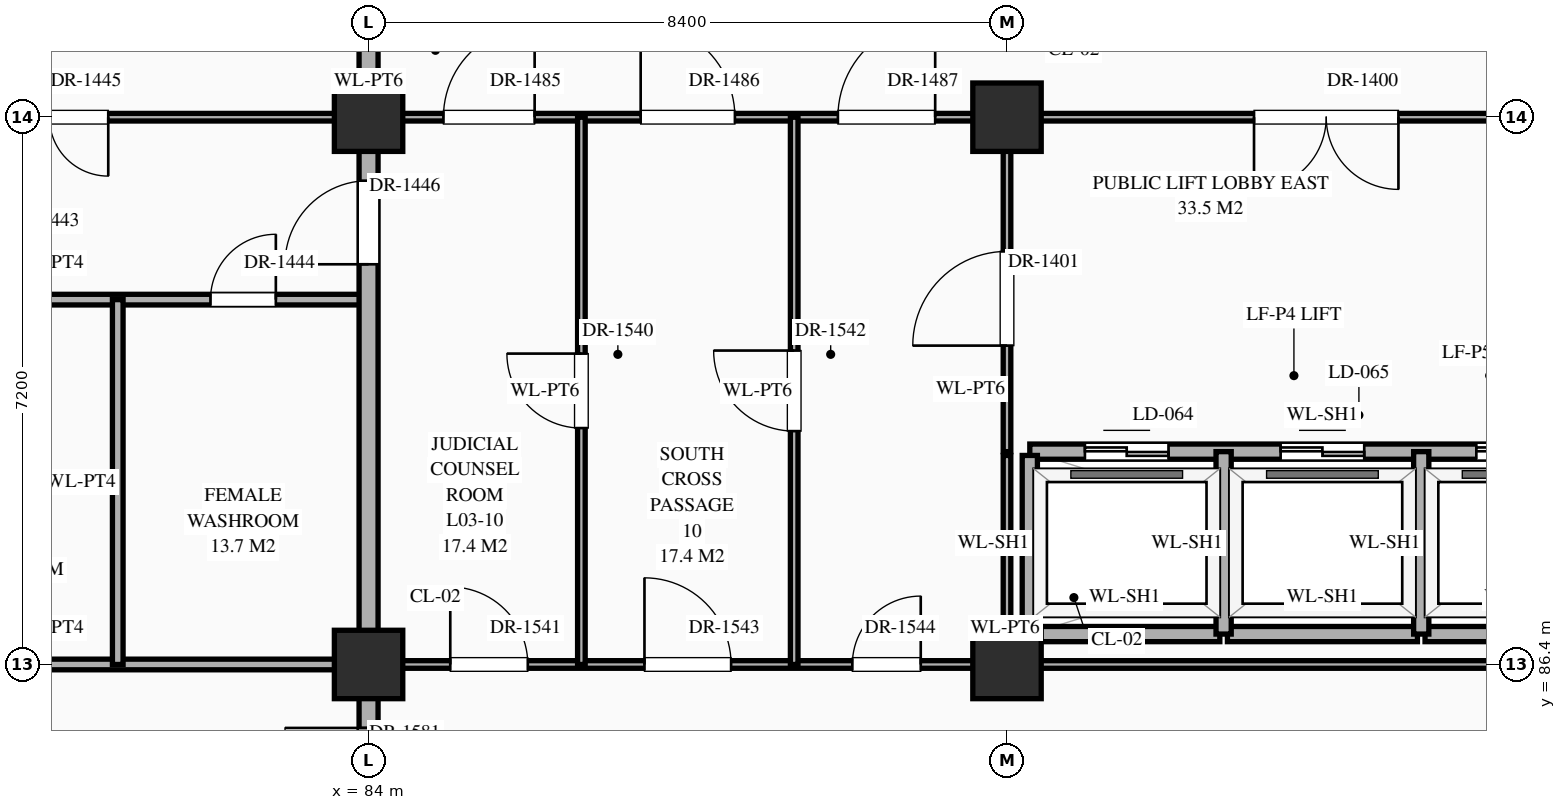
"""IFC4 building model, lengths in metres.
Left out: names, types, materials, properties, quantities, classifications, styles, units other than length and angle.
Written with IfcOpenShell. Run it as: python <this file> out.ifc"""

import sys

from ifc_helpers import new_model, si_unit, direction, frame, frame_2d, origin, origin_2d, place, context, subcontext, project, spatial, rectangle, extrude, element, fill, save


model = new_model("IFC4")
c1 = context("Model", 3, precision=1e-05, world=origin(), true_north=direction((0.0, 1.0)))
c2 = subcontext(c1, "Body", "Model", "MODEL_VIEW")
j1 = project(units=[si_unit("LENGTHUNIT", "METRE"), si_unit("PLANEANGLEUNIT", "RADIAN")], contexts=[c1])
p1 = place(None, origin())
s1 = spatial("IfcSite", under=j1, at=p1, CompositionType="ELEMENT")
p2 = place(p1, origin())
s2 = spatial("IfcBuilding", under=s1, at=p2, CompositionType="ELEMENT")
p3 = place(p2, frame((0.0, 0.0, 10.8)))
s3 = spatial("IfcBuildingStorey", under=s2, at=p3, CompositionType="ELEMENT", Elevation=10.8)
for number, where, z_axis, x_axis in (
    (1, (84.0, 86.4, 0.0), (0.0, 0.0, 1.0), (1.0, 0.0, 0.0)),
    (2, (84.0, 93.6, 0.0), (0.0, 0.0, 1.0), (1.0, 0.0, 0.0)),
    (3, (92.4, 86.4, 0.0), (0.0, 0.0, 1.0), (1.0, 0.0, 0.0)),
    (4, (92.4, 93.6, 0.0), (0.0, 0.0, 1.0), (1.0, 0.0, 0.0)),
):
    element("IfcColumn", number, at=place(p3, frame(where, z_axis=z_axis, x_axis=x_axis)), inside=s3, PredefinedType="COLUMN", context=c2, shape_type="SweptSolid", body=[
        extrude(rectangle(XDim=0.9, YDim=0.9, at=origin_2d()), origin(), (0.0, 0.0, 1.0), 5.4),
    ])
p4 = place(p3, frame((75.6, 86.4, 0.0), z_axis=(0.0, 0.0, 1.0), x_axis=(1.0, 0.0, 0.0)))
e5 = element("IfcWall", 5, at=p4, inside=s3, PredefinedType="STANDARD", context=c2, shape_type="SweptSolid", body=[
    extrude(rectangle(XDim=8.4, YDim=0.14, at=frame_2d((4.2, 0.0))), origin(), (0.0, 0.0, 1.0), 4.27),
])
p5 = place(p3, frame((84.0, 86.4, 0.0), z_axis=(0.0, 0.0, 1.0), x_axis=(1.0, 0.0, 0.0)))
e6 = element("IfcWall", 6, at=p5, inside=s3, PredefinedType="STANDARD", context=c2, shape_type="SweptSolid", body=[
    extrude(rectangle(XDim=8.4, YDim=0.1, at=frame_2d((4.2, 0.0))), origin(), (0.0, 0.0, 1.0), 4.27),
])
p6 = place(p5, frame((1.075, 0.0, 0.0)))
e7 = element("IfcOpeningElement", 7, at=p6, cuts=e6, PredefinedType="OPENING", context=c2, shape_type="SweptSolid", body=[
    extrude(rectangle(XDim=1.02, YDim=2.4, at=frame_2d((0.51, 1.2))), frame((0.0, 0.062, 0.0), z_axis=(0.0, -1.0, 0.0), x_axis=(1.0, 0.0, 0.0)), (0.0, 0.0, 1.0), 0.124),
])
p7 = place(p5, frame((3.63, 0.0, 0.0)))
e8 = element("IfcOpeningElement", 8, at=p7, cuts=e6, PredefinedType="OPENING", context=c2, shape_type="SweptSolid", body=[
    extrude(rectangle(XDim=1.14, YDim=2.4, at=frame_2d((0.57, 1.2))), frame((0.0, 0.062, 0.0), z_axis=(0.0, -1.0, 0.0), x_axis=(1.0, 0.0, 0.0)), (0.0, 0.0, 1.0), 0.124),
])
p8 = place(p5, frame((6.365, 0.0, 0.0)))
e9 = element("IfcOpeningElement", 9, at=p8, cuts=e6, PredefinedType="OPENING", context=c2, shape_type="SweptSolid", body=[
    extrude(rectangle(XDim=0.9, YDim=2.15, at=frame_2d((0.45, 1.075))), frame((0.0, 0.062, 0.0), z_axis=(0.0, -1.0, 0.0), x_axis=(1.0, 0.0, 0.0)), (0.0, 0.0, 1.0), 0.124),
])
p9 = place(p3, frame((92.45, 86.4, 0.0), z_axis=(0.0, 0.0, 1.0), x_axis=(1.0, 0.0, 0.0)))
e10 = element("IfcWall", 10, at=p9, inside=s3, PredefinedType="STANDARD", context=c2, shape_type="SweptSolid", body=[
    extrude(rectangle(XDim=8.3, YDim=0.1, at=frame_2d((4.15, 0.0))), origin(), (0.0, 0.0, 1.0), 4.27),
])
for number, where, z_axis, x_axis in (
    (11, (92.7, 86.8, 0.0), (0.0, 0.0, 1.0), (1.0, 0.0, 0.0)),
    (12, (95.3, 86.8, 0.0), (0.0, 0.0, 1.0), (1.0, 0.0, 0.0)),
    (13, (97.9, 86.8, 0.0), (0.0, 0.0, 1.0), (1.0, 0.0, 0.0)),
):
    element("IfcWall", number, at=place(p3, frame(where, z_axis=z_axis, x_axis=x_axis)), inside=s3, PredefinedType="STANDARD", context=c2, shape_type="SweptSolid", body=[
        extrude(rectangle(XDim=2.5, YDim=0.2, at=frame_2d((1.25, 0.0))), origin(), (0.0, 0.0, 1.0), 5.12),
    ])
p10 = place(p3, frame((92.7, 89.2, 0.0), z_axis=(0.0, 0.0, 1.0), x_axis=(1.0, 0.0, 0.0)))
e14 = element("IfcWall", 14, at=p10, inside=s3, PredefinedType="STANDARD", context=c2, shape_type="SweptSolid", body=[
    extrude(rectangle(XDim=7.7, YDim=0.2, at=frame_2d((3.85, 0.0))), origin(), (0.0, 0.0, 1.0), 5.12),
])
p11 = place(p10, frame((0.725, 0.0, 0.0)))
e15 = element("IfcOpeningElement", 15, at=p11, cuts=e14, PredefinedType="OPENING", context=c2, shape_type="SweptSolid", body=[
    extrude(rectangle(XDim=1.1, YDim=2.15, at=frame_2d((0.55, 1.075))), frame((0.0, 0.112, 0.0), z_axis=(0.0, -1.0, 0.0), x_axis=(1.0, 0.0, 0.0)), (0.0, 0.0, 1.0), 0.224),
])
p12 = place(p10, frame((3.3, 0.0, 0.0)))
e16 = element("IfcOpeningElement", 16, at=p12, cuts=e14, PredefinedType="OPENING", context=c2, shape_type="SweptSolid", body=[
    extrude(rectangle(XDim=1.1, YDim=2.15, at=frame_2d((0.55, 1.075))), frame((0.0, 0.112, 0.0), z_axis=(0.0, -1.0, 0.0), x_axis=(1.0, 0.0, 0.0)), (0.0, 0.0, 1.0), 0.224),
])
p13 = place(p10, frame((5.875, 0.0, 0.0)))
e17 = element("IfcOpeningElement", 17, at=p13, cuts=e14, PredefinedType="OPENING", context=c2, shape_type="SweptSolid", body=[
    extrude(rectangle(XDim=1.1, YDim=2.15, at=frame_2d((0.55, 1.075))), frame((0.0, 0.112, 0.0), z_axis=(0.0, -1.0, 0.0), x_axis=(1.0, 0.0, 0.0)), (0.0, 0.0, 1.0), 0.224),
])
p14 = place(p3, frame((75.6, 91.2, 0.0), z_axis=(0.0, 0.0, 1.0), x_axis=(1.0, 0.0, 0.0)))
e18 = element("IfcWall", 18, at=p14, inside=s3, PredefinedType="STANDARD", context=c2, shape_type="SweptSolid", body=[
    extrude(rectangle(XDim=8.4, YDim=0.14, at=frame_2d((4.2, 0.0))), origin(), (0.0, 0.0, 1.0), 5.12),
])
p15 = place(p14, frame((0.65, 0.0, 0.0)))
e19 = element("IfcOpeningElement", 19, at=p15, cuts=e18, PredefinedType="OPENING", context=c2, shape_type="SweptSolid", body=[
    extrude(rectangle(XDim=0.9, YDim=2.15, at=frame_2d((0.45, 1.075))), frame((0.0, 0.082, 0.0), z_axis=(0.0, -1.0, 0.0), x_axis=(1.0, 0.0, 0.0)), (0.0, 0.0, 1.0), 0.164),
])
p16 = place(p14, frame((3.22, 0.0, 0.0)))
e20 = element("IfcOpeningElement", 20, at=p16, cuts=e18, PredefinedType="OPENING", context=c2, shape_type="SweptSolid", body=[
    extrude(rectangle(XDim=0.86, YDim=2.1, at=frame_2d((0.43, 1.05))), frame((0.0, 0.082, 0.0), z_axis=(0.0, -1.0, 0.0), x_axis=(1.0, 0.0, 0.0)), (0.0, 0.0, 1.0), 0.164),
])
p17 = place(p14, frame((6.32, 0.0, 0.0)))
e21 = element("IfcOpeningElement", 21, at=p17, cuts=e18, PredefinedType="OPENING", context=c2, shape_type="SweptSolid", body=[
    extrude(rectangle(XDim=0.86, YDim=2.1, at=frame_2d((0.43, 1.05))), frame((0.0, 0.082, 0.0), z_axis=(0.0, -1.0, 0.0), x_axis=(1.0, 0.0, 0.0)), (0.0, 0.0, 1.0), 0.164),
])
p18 = place(p3, frame((67.2, 93.6, 0.0), z_axis=(0.0, 0.0, 1.0), x_axis=(1.0, 0.0, 0.0)))
e22 = element("IfcWall", 22, at=p18, inside=s3, PredefinedType="STANDARD", context=c2, shape_type="SweptSolid", body=[
    extrude(rectangle(XDim=33.6, YDim=0.1, at=frame_2d((16.8, 0.0))), origin(), (0.0, 0.0, 1.0), 4.27),
])
p19 = place(p18, frame((3.475, 0.0, 0.0)))
e23 = element("IfcOpeningElement", 23, at=p19, cuts=e22, PredefinedType="OPENING", context=c2, shape_type="SweptSolid", body=[
    extrude(rectangle(XDim=1.45, YDim=2.3, at=frame_2d((0.725, 1.15))), frame((0.0, 0.062, 0.0), z_axis=(0.0, -1.0, 0.0), x_axis=(1.0, 0.0, 0.0)), (0.0, 0.0, 1.0), 0.124),
])
p20 = place(p18, frame((28.45, 0.0, 0.0)))
e24 = element("IfcOpeningElement", 24, at=p20, cuts=e22, PredefinedType="OPENING", context=c2, shape_type="SweptSolid", body=[
    extrude(rectangle(XDim=1.9, YDim=2.5, at=frame_2d((0.95, 1.25))), frame((0.0, 0.062, 0.0), z_axis=(0.0, -1.0, 0.0), x_axis=(1.0, 0.0, 0.0)), (0.0, 0.0, 1.0), 0.124),
])
p21 = place(p18, frame((11.825, 0.0, 0.0)))
e25 = element("IfcOpeningElement", 25, at=p21, cuts=e22, PredefinedType="OPENING", context=c2, shape_type="SweptSolid", body=[
    extrude(rectangle(XDim=1.55, YDim=2.35, at=frame_2d((0.775, 1.175))), frame((0.0, 0.062, 0.0), z_axis=(0.0, -1.0, 0.0), x_axis=(1.0, 0.0, 0.0)), (0.0, 0.0, 1.0), 0.124),
])
p22 = place(p18, frame((17.785, 0.0, 0.0)))
e26 = element("IfcOpeningElement", 26, at=p22, cuts=e22, PredefinedType="OPENING", context=c2, shape_type="SweptSolid", body=[
    extrude(rectangle(XDim=1.2, YDim=2.35, at=frame_2d((0.6, 1.175))), frame((0.0, 0.062, 0.0), z_axis=(0.0, -1.0, 0.0), x_axis=(1.0, 0.0, 0.0)), (0.0, 0.0, 1.0), 0.124),
])
p23 = place(p18, frame((20.38, 0.0, 0.0)))
e27 = element("IfcOpeningElement", 27, at=p23, cuts=e22, PredefinedType="OPENING", context=c2, shape_type="SweptSolid", body=[
    extrude(rectangle(XDim=1.24, YDim=2.3, at=frame_2d((0.62, 1.15))), frame((0.0, 0.062, 0.0), z_axis=(0.0, -1.0, 0.0), x_axis=(1.0, 0.0, 0.0)), (0.0, 0.0, 1.0), 0.124),
])
p24 = place(p18, frame((22.975, 0.0, 0.0)))
e28 = element("IfcOpeningElement", 28, at=p24, cuts=e22, PredefinedType="OPENING", context=c2, shape_type="SweptSolid", body=[
    extrude(rectangle(XDim=1.28, YDim=2.35, at=frame_2d((0.64, 1.175))), frame((0.0, 0.062, 0.0), z_axis=(0.0, -1.0, 0.0), x_axis=(1.0, 0.0, 0.0)), (0.0, 0.0, 1.0), 0.124),
])
p25 = place(p3, frame((80.7, 86.4, 0.0), z_axis=(0.0, 0.0, 1.0), x_axis=(0.0, 1.0, 0.0)))
e29 = element("IfcWall", 29, at=p25, inside=s3, PredefinedType="STANDARD", context=c2, shape_type="SweptSolid", body=[
    extrude(rectangle(XDim=4.8, YDim=0.14, at=frame_2d((2.4, 0.0))), origin(), (0.0, 0.0, 1.0), 5.12),
])
p26 = place(p3, frame((84.0, 79.2, 0.0), z_axis=(0.0, 0.0, 1.0), x_axis=(0.0, 1.0, 0.0)))
e30 = element("IfcWall", 30, at=p26, inside=s3, PredefinedType="STANDARD", context=c2, shape_type="SweptSolid", body=[
    extrude(rectangle(XDim=35.96, YDim=0.25, at=frame_2d((17.98, 0.0))), origin(), (0.0, 0.0, 1.0), 4.37),
])
p27 = place(p26, frame((22.835, 0.0, 0.0)))
e31 = element("IfcOpeningElement", 31, at=p27, cuts=e30, PredefinedType="OPENING", context=c2, shape_type="SweptSolid", body=[
    extrude(rectangle(XDim=1.5, YDim=2.25, at=frame_2d((0.75, 1.125))), frame((0.0, 0.137, 0.0), z_axis=(0.0, -1.0, 0.0), x_axis=(1.0, 0.0, 0.0)), (0.0, 0.0, 1.0), 0.274),
])
p28 = place(p26, frame((12.465, 0.0, 0.0)))
e32 = element("IfcOpeningElement", 32, at=p28, cuts=e30, PredefinedType="OPENING", context=c2, shape_type="SweptSolid", body=[
    extrude(rectangle(XDim=1.1, YDim=2.2, at=frame_2d((0.55, 1.1))), frame((0.0, 0.137, 0.0), z_axis=(0.0, -1.0, 0.0), x_axis=(1.0, 0.0, 0.0)), (0.0, 0.0, 1.0), 0.274),
])
p29 = place(p26, frame((15.31, 0.0, 0.0)))
e33 = element("IfcOpeningElement", 33, at=p29, cuts=e30, PredefinedType="OPENING", context=c2, shape_type="SweptSolid", body=[
    extrude(rectangle(XDim=0.95, YDim=2.15, at=frame_2d((0.475, 1.075))), frame((0.0, 0.137, 0.0), z_axis=(0.0, -1.0, 0.0), x_axis=(1.0, 0.0, 0.0)), (0.0, 0.0, 1.0), 0.274),
])
p30 = place(p26, frame((25.915, 0.0, 0.0)))
e34 = element("IfcOpeningElement", 34, at=p30, cuts=e30, PredefinedType="OPENING", context=c2, shape_type="SweptSolid", body=[
    extrude(rectangle(XDim=1.8, YDim=2.35, at=frame_2d((0.9, 1.175))), frame((0.0, 0.137, 0.0), z_axis=(0.0, -1.0, 0.0), x_axis=(1.0, 0.0, 0.0)), (0.0, 0.0, 1.0), 0.274),
])
p31 = place(p26, frame((29.71, 0.0, 0.0)))
e35 = element("IfcOpeningElement", 35, at=p31, cuts=e30, PredefinedType="OPENING", context=c2, shape_type="SweptSolid", body=[
    extrude(rectangle(XDim=0.95, YDim=2.15, at=frame_2d((0.475, 1.075))), frame((0.0, 0.137, 0.0), z_axis=(0.0, -1.0, 0.0), x_axis=(1.0, 0.0, 0.0)), (0.0, 0.0, 1.0), 0.274),
])
p32 = place(p26, frame((5.265, 0.0, 0.0)))
e36 = element("IfcOpeningElement", 36, at=p32, cuts=e30, PredefinedType="OPENING", context=c2, shape_type="SweptSolid", body=[
    extrude(rectangle(XDim=1.1, YDim=2.2, at=frame_2d((0.55, 1.1))), frame((0.0, 0.137, 0.0), z_axis=(0.0, -1.0, 0.0), x_axis=(1.0, 0.0, 0.0)), (0.0, 0.0, 1.0), 0.274),
])
p33 = place(p3, frame((86.8, 86.4, 0.0), z_axis=(0.0, 0.0, 1.0), x_axis=(0.0, 1.0, 0.0)))
e37 = element("IfcWall", 37, at=p33, inside=s3, PredefinedType="STANDARD", context=c2, shape_type="SweptSolid", body=[
    extrude(rectangle(XDim=7.2, YDim=0.1, at=frame_2d((3.6, 0.0))), origin(), (0.0, 0.0, 1.0), 5.12),
])
p34 = place(p33, frame((3.11, 0.0, 0.0)))
e38 = element("IfcOpeningElement", 38, at=p34, cuts=e37, PredefinedType="OPENING", context=c2, shape_type="SweptSolid", body=[
    extrude(rectangle(XDim=0.98, YDim=2.35, at=frame_2d((0.49, 1.175))), frame((0.0, 0.062, 0.0), z_axis=(0.0, -1.0, 0.0), x_axis=(1.0, 0.0, 0.0)), (0.0, 0.0, 1.0), 0.124),
])
p35 = place(p3, frame((89.6, 86.4, 0.0), z_axis=(0.0, 0.0, 1.0), x_axis=(0.0, 1.0, 0.0)))
e39 = element("IfcWall", 39, at=p35, inside=s3, PredefinedType="STANDARD", context=c2, shape_type="SweptSolid", body=[
    extrude(rectangle(XDim=7.2, YDim=0.1, at=frame_2d((3.6, 0.0))), origin(), (0.0, 0.0, 1.0), 5.12),
])
p36 = place(p35, frame((3.07, 0.0, 0.0)))
e40 = element("IfcOpeningElement", 40, at=p36, cuts=e39, PredefinedType="OPENING", context=c2, shape_type="SweptSolid", body=[
    extrude(rectangle(XDim=1.06, YDim=2.4, at=frame_2d((0.53, 1.2))), frame((0.0, 0.062, 0.0), z_axis=(0.0, -1.0, 0.0), x_axis=(1.0, 0.0, 0.0)), (0.0, 0.0, 1.0), 0.124),
])
p37 = place(p3, frame((92.4, 86.45, 0.0), z_axis=(0.0, 0.0, 1.0), x_axis=(0.0, 1.0, 0.0)))
e41 = element("IfcWall", 41, at=p37, inside=s3, PredefinedType="STANDARD", context=c2, shape_type="SweptSolid", body=[
    extrude(rectangle(XDim=2.7, YDim=0.1, at=frame_2d((1.35, 0.0))), origin(), (0.0, 0.0, 1.0), 4.37),
])
p38 = place(p3, frame((92.4, 89.2, 0.0), z_axis=(0.0, 0.0, 1.0), x_axis=(0.0, 1.0, 0.0)))
e42 = element("IfcWall", 42, at=p38, inside=s3, PredefinedType="STANDARD", context=c2, shape_type="SweptSolid", body=[
    extrude(rectangle(XDim=4.4, YDim=0.1, at=frame_2d((2.2, 0.0))), origin(), (0.0, 0.0, 1.0), 4.37),
])
p39 = place(p38, frame((1.395, 0.0, 0.0)))
e43 = element("IfcOpeningElement", 43, at=p39, cuts=e42, PredefinedType="OPENING", context=c2, shape_type="SweptSolid", body=[
    extrude(rectangle(XDim=1.24, YDim=2.3, at=frame_2d((0.62, 1.15))), frame((0.0, 0.062, 0.0), z_axis=(0.0, -1.0, 0.0), x_axis=(1.0, 0.0, 0.0)), (0.0, 0.0, 1.0), 0.124),
])
p40 = place(p3, frame((92.7, 86.85, 0.0), z_axis=(0.0, 0.0, 1.0), x_axis=(0.0, 1.0, 0.0)))
e44 = element("IfcWall", 44, at=p40, inside=s3, PredefinedType="STANDARD", context=c2, shape_type="SweptSolid", body=[
    extrude(rectangle(XDim=2.3, YDim=0.2, at=frame_2d((1.15, 0.0))), origin(), (0.0, 0.0, 1.0), 5.12),
])
for number, where, z_axis, x_axis in (
    (45, (95.25, 86.8, 0.0), (0.0, 0.0, 1.0), (0.0, 1.0, 0.0)),
    (46, (97.85, 86.8, 0.0), (0.0, 0.0, 1.0), (0.0, 1.0, 0.0)),
):
    element("IfcWall", number, at=place(p3, frame(where, z_axis=z_axis, x_axis=x_axis)), inside=s3, PredefinedType="STANDARD", context=c2, shape_type="SweptSolid", body=[
        extrude(rectangle(XDim=2.4, YDim=0.2, at=frame_2d((1.2, 0.0))), origin(), (0.0, 0.0, 1.0), 5.12),
    ])
p41 = place(p11, origin())
e47 = element("IfcDoor", 47, at=p41, inside=s3, OperationType="DOUBLE_DOOR_SLIDING", PredefinedType="DOOR", context=c2, shape_type="SweptSolid", body=[
    extrude(rectangle(XDim=1.1, YDim=2.15, at=frame_2d((0.55, 1.075))), frame((0.0, 0.025, 0.0), z_axis=(0.0, -1.0, 0.0), x_axis=(1.0, 0.0, 0.0)), (0.0, 0.0, 1.0), 0.05),
])
fill(e15, e47)
p42 = place(p12, origin())
e48 = element("IfcDoor", 48, at=p42, inside=s3, OperationType="DOUBLE_DOOR_SLIDING", PredefinedType="DOOR", context=c2, shape_type="SweptSolid", body=[
    extrude(rectangle(XDim=1.1, YDim=2.15, at=frame_2d((0.55, 1.075))), frame((0.0, 0.025, 0.0), z_axis=(0.0, -1.0, 0.0), x_axis=(1.0, 0.0, 0.0)), (0.0, 0.0, 1.0), 0.05),
])
fill(e16, e48)
p43 = place(p13, origin())
e49 = element("IfcDoor", 49, at=p43, inside=s3, OperationType="DOUBLE_DOOR_SLIDING", PredefinedType="DOOR", context=c2, shape_type="SweptSolid", body=[
    extrude(rectangle(XDim=1.1, YDim=2.15, at=frame_2d((0.55, 1.075))), frame((0.0, 0.025, 0.0), z_axis=(0.0, -1.0, 0.0), x_axis=(1.0, 0.0, 0.0)), (0.0, 0.0, 1.0), 0.05),
])
fill(e17, e49)
p44 = place(p20, frame((1.9, 0.0, 0.0), z_axis=(0.0, 0.0, 1.0), x_axis=(-1.0, 0.0, 0.0)))
e50 = element("IfcDoor", 50, at=p44, inside=s3, OperationType="DOUBLE_DOOR_SINGLE_SWING", PredefinedType="DOOR", context=c2, shape_type="SweptSolid", body=[
    extrude(rectangle(XDim=1.9, YDim=2.5, at=frame_2d((0.95, 1.25))), frame((0.0, 0.025, 0.0), z_axis=(0.0, -1.0, 0.0), x_axis=(1.0, 0.0, 0.0)), (0.0, 0.0, 1.0), 0.05),
])
fill(e24, e50)
p45 = place(p39, origin())
e51 = element("IfcDoor", 51, at=p45, inside=s3, OperationType="SINGLE_SWING_LEFT", PredefinedType="DOOR", context=c2, shape_type="SweptSolid", body=[
    extrude(rectangle(XDim=1.24, YDim=2.3, at=frame_2d((0.62, 1.15))), frame((0.0, 0.025, 0.0), z_axis=(0.0, -1.0, 0.0), x_axis=(1.0, 0.0, 0.0)), (0.0, 0.0, 1.0), 0.05),
])
fill(e43, e51)
p46 = place(p17, origin())
e52 = element("IfcDoor", 52, at=p46, inside=s3, OperationType="SINGLE_SWING_RIGHT", PredefinedType="DOOR", context=c2, shape_type="SweptSolid", body=[
    extrude(rectangle(XDim=0.86, YDim=2.1, at=frame_2d((0.43, 1.05))), frame((0.0, 0.025, 0.0), z_axis=(0.0, -1.0, 0.0), x_axis=(1.0, 0.0, 0.0)), (0.0, 0.0, 1.0), 0.05),
])
fill(e21, e52)
p47 = place(p21, frame((1.55, 0.0, 0.0), z_axis=(0.0, 0.0, 1.0), x_axis=(-1.0, 0.0, 0.0)))
e53 = element("IfcDoor", 53, at=p47, inside=s3, OperationType="DOUBLE_DOOR_SINGLE_SWING", PredefinedType="DOOR", context=c2, shape_type="SweptSolid", body=[
    extrude(rectangle(XDim=1.55, YDim=2.35, at=frame_2d((0.775, 1.175))), frame((0.0, 0.025, 0.0), z_axis=(0.0, -1.0, 0.0), x_axis=(1.0, 0.0, 0.0)), (0.0, 0.0, 1.0), 0.05),
])
fill(e25, e53)
p48 = place(p28, origin())
e54 = element("IfcDoor", 54, at=p48, inside=s3, OperationType="SINGLE_SWING_LEFT", PredefinedType="DOOR", context=c2, shape_type="SweptSolid", body=[
    extrude(rectangle(XDim=1.1, YDim=2.2, at=frame_2d((0.55, 1.1))), frame((0.0, 0.025, 0.0), z_axis=(0.0, -1.0, 0.0), x_axis=(1.0, 0.0, 0.0)), (0.0, 0.0, 1.0), 0.05),
])
fill(e32, e54)
p49 = place(p22, origin())
e55 = element("IfcDoor", 55, at=p49, inside=s3, OperationType="SINGLE_SWING_RIGHT", PredefinedType="DOOR", context=c2, shape_type="SweptSolid", body=[
    extrude(rectangle(XDim=1.2, YDim=2.35, at=frame_2d((0.6, 1.175))), frame((0.0, 0.025, 0.0), z_axis=(0.0, -1.0, 0.0), x_axis=(1.0, 0.0, 0.0)), (0.0, 0.0, 1.0), 0.05),
])
fill(e26, e55)
p50 = place(p23, origin())
e56 = element("IfcDoor", 56, at=p50, inside=s3, OperationType="SINGLE_SWING_LEFT", PredefinedType="DOOR", context=c2, shape_type="SweptSolid", body=[
    extrude(rectangle(XDim=1.24, YDim=2.3, at=frame_2d((0.62, 1.15))), frame((0.0, 0.025, 0.0), z_axis=(0.0, -1.0, 0.0), x_axis=(1.0, 0.0, 0.0)), (0.0, 0.0, 1.0), 0.05),
])
fill(e27, e56)
p51 = place(p24, origin())
e57 = element("IfcDoor", 57, at=p51, inside=s3, OperationType="SINGLE_SWING_RIGHT", PredefinedType="DOOR", context=c2, shape_type="SweptSolid", body=[
    extrude(rectangle(XDim=1.28, YDim=2.35, at=frame_2d((0.64, 1.175))), frame((0.0, 0.025, 0.0), z_axis=(0.0, -1.0, 0.0), x_axis=(1.0, 0.0, 0.0)), (0.0, 0.0, 1.0), 0.05),
])
fill(e28, e57)
p52 = place(p34, origin())
e58 = element("IfcDoor", 58, at=p52, inside=s3, OperationType="SINGLE_SWING_RIGHT", PredefinedType="DOOR", context=c2, shape_type="SweptSolid", body=[
    extrude(rectangle(XDim=0.98, YDim=2.35, at=frame_2d((0.49, 1.175))), frame((0.0, 0.025, 0.0), z_axis=(0.0, -1.0, 0.0), x_axis=(1.0, 0.0, 0.0)), (0.0, 0.0, 1.0), 0.05),
])
fill(e38, e58)
p53 = place(p6, origin())
e59 = element("IfcDoor", 59, at=p53, inside=s3, OperationType="SINGLE_SWING_LEFT", PredefinedType="DOOR", context=c2, shape_type="SweptSolid", body=[
    extrude(rectangle(XDim=1.02, YDim=2.4, at=frame_2d((0.51, 1.2))), frame((0.0, 0.025, 0.0), z_axis=(0.0, -1.0, 0.0), x_axis=(1.0, 0.0, 0.0)), (0.0, 0.0, 1.0), 0.05),
])
fill(e7, e59)
p54 = place(p36, origin())
e60 = element("IfcDoor", 60, at=p54, inside=s3, OperationType="SINGLE_SWING_RIGHT", PredefinedType="DOOR", context=c2, shape_type="SweptSolid", body=[
    extrude(rectangle(XDim=1.06, YDim=2.4, at=frame_2d((0.53, 1.2))), frame((0.0, 0.025, 0.0), z_axis=(0.0, -1.0, 0.0), x_axis=(1.0, 0.0, 0.0)), (0.0, 0.0, 1.0), 0.05),
])
fill(e40, e60)
p55 = place(p7, origin())
e61 = element("IfcDoor", 61, at=p55, inside=s3, OperationType="SINGLE_SWING_LEFT", PredefinedType="DOOR", context=c2, shape_type="SweptSolid", body=[
    extrude(rectangle(XDim=1.14, YDim=2.4, at=frame_2d((0.57, 1.2))), frame((0.0, 0.025, 0.0), z_axis=(0.0, -1.0, 0.0), x_axis=(1.0, 0.0, 0.0)), (0.0, 0.0, 1.0), 0.05),
])
fill(e8, e61)
p56 = place(p8, origin())
e62 = element("IfcDoor", 62, at=p56, inside=s3, OperationType="SINGLE_SWING_RIGHT", PredefinedType="DOOR", context=c2, shape_type="SweptSolid", body=[
    extrude(rectangle(XDim=0.9, YDim=2.15, at=frame_2d((0.45, 1.075))), frame((0.0, 0.025, 0.0), z_axis=(0.0, -1.0, 0.0), x_axis=(1.0, 0.0, 0.0)), (0.0, 0.0, 1.0), 0.05),
])
fill(e9, e62)
p57 = place(p32, origin())
e63 = element("IfcDoor", 63, at=p57, inside=s3, OperationType="SINGLE_SWING_RIGHT", PredefinedType="DOOR", context=c2, shape_type="SweptSolid", body=[
    extrude(rectangle(XDim=1.1, YDim=2.2, at=frame_2d((0.55, 1.1))), frame((0.0, 0.025, 0.0), z_axis=(0.0, -1.0, 0.0), x_axis=(1.0, 0.0, 0.0)), (0.0, 0.0, 1.0), 0.05),
])
fill(e36, e63)
save(model, sys.argv[1])
